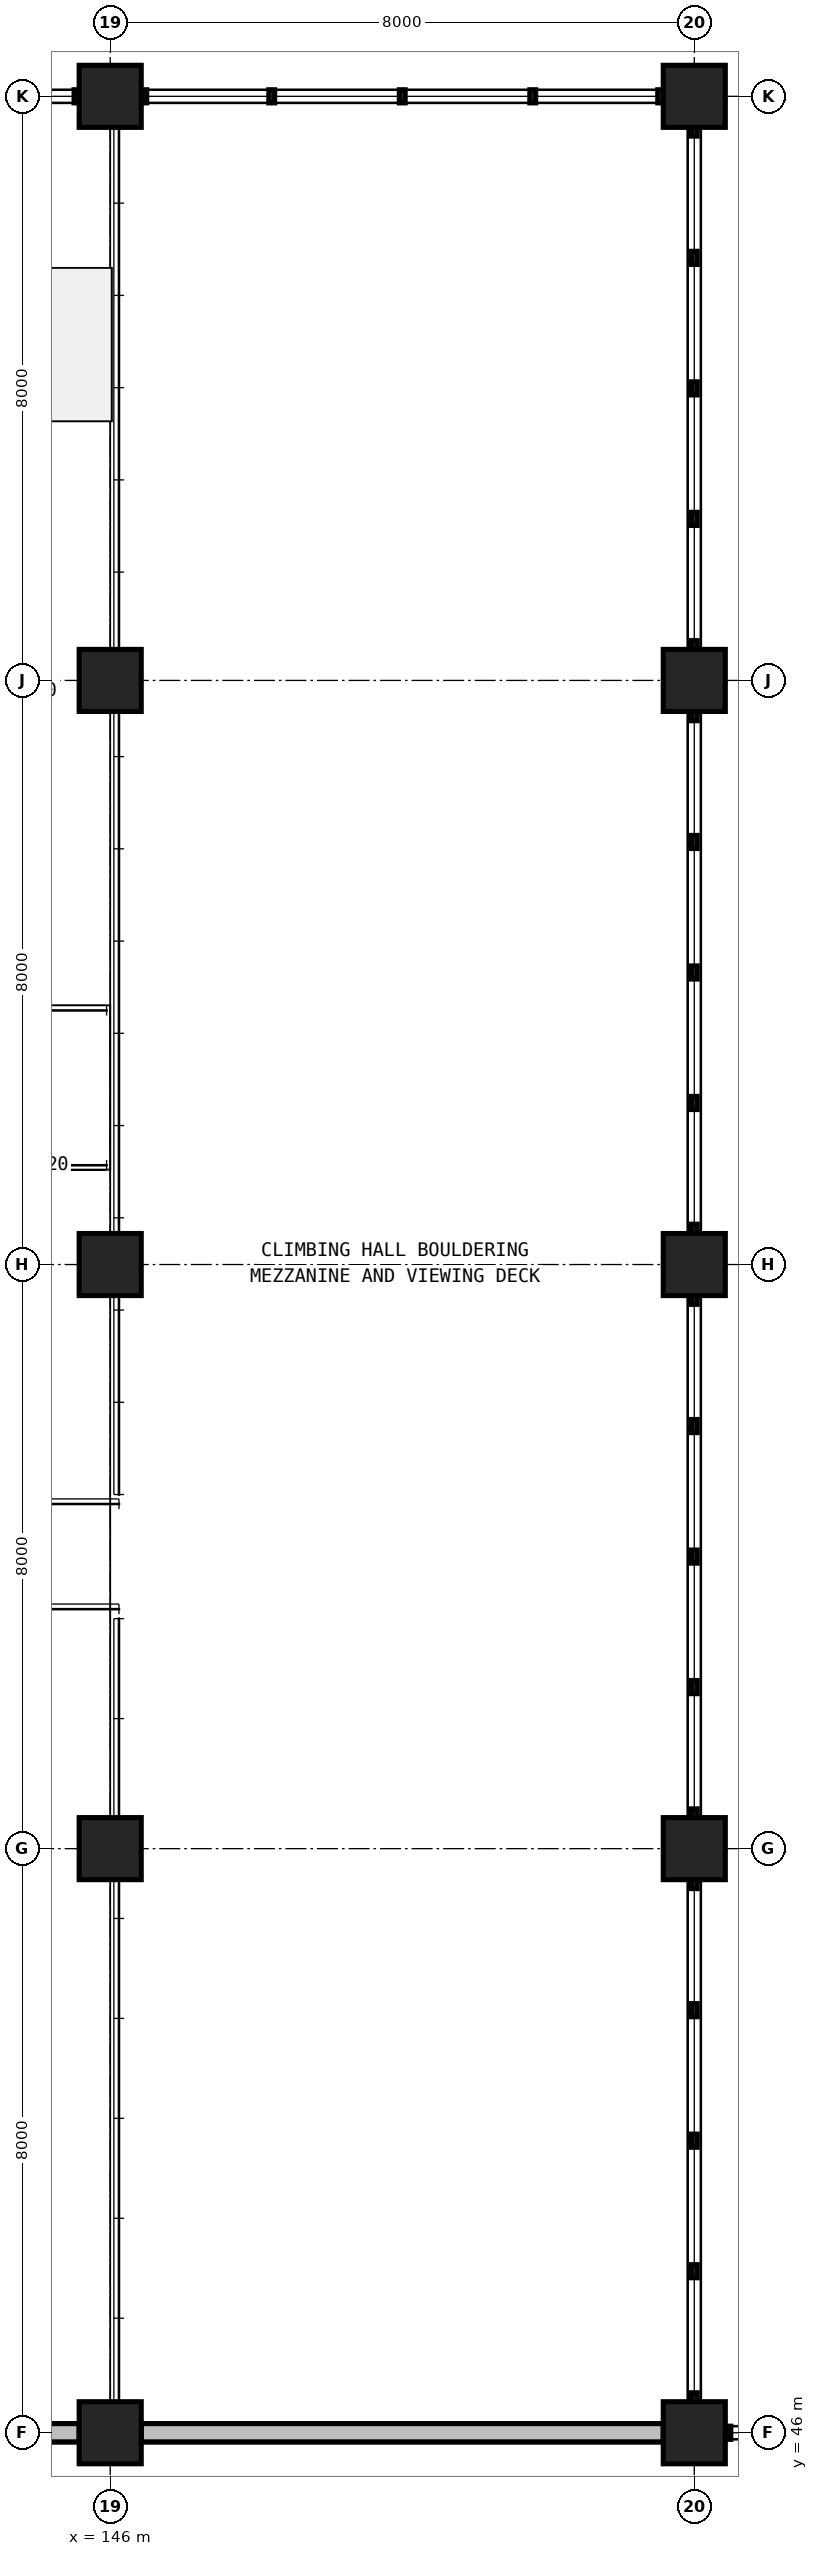
"""IFC4 building model, lengths in metres.
Left out: names, types, materials, properties, quantities, classifications, styles, units other than length and angle.
Written with IfcOpenShell. Run it as: python <this file> out.ifc"""

import sys

from ifc_helpers import new_model, si_unit, direction, frame, frame_2d, origin, origin_2d, place, context, subcontext, project, spatial, rectangle, extrude, element, save


model = new_model("IFC4")
c1 = context("Model", 3, precision=1e-05, world=origin(), true_north=direction((0.0, 1.0)))
c2 = subcontext(c1, "Body", "Model", "MODEL_VIEW")
j1 = project(units=[si_unit("LENGTHUNIT", "METRE"), si_unit("PLANEANGLEUNIT", "RADIAN")], contexts=[c1])
p1 = place(None, origin())
s1 = spatial("IfcSite", under=j1, at=p1, CompositionType="ELEMENT")
p2 = place(p1, origin())
s2 = spatial("IfcBuilding", under=s1, at=p2, CompositionType="ELEMENT")
p3 = place(p2, frame((0.0, 0.0, 5.4)))
s3 = spatial("IfcBuildingStorey", under=s2, at=p3, CompositionType="ELEMENT", Elevation=5.4)
for number, where, z_axis, x_axis in (
    (1, (146.0, 46.0, 0.0), (0.0, 0.0, 1.0), (1.0, 0.0, 0.0)),
    (2, (146.0, 54.0, 0.0), (0.0, 0.0, 1.0), (1.0, 0.0, 0.0)),
    (3, (146.0, 62.0, 0.0), (0.0, 0.0, 1.0), (1.0, 0.0, 0.0)),
    (4, (146.0, 70.0, 0.0), (0.0, 0.0, 1.0), (1.0, 0.0, 0.0)),
    (5, (146.0, 78.0, 0.0), (0.0, 0.0, 1.0), (1.0, 0.0, 0.0)),
    (6, (154.0, 46.0, 0.0), (0.0, 0.0, 1.0), (1.0, 0.0, 0.0)),
    (7, (154.0, 54.0, 0.0), (0.0, 0.0, 1.0), (1.0, 0.0, 0.0)),
    (8, (154.0, 62.0, 0.0), (0.0, 0.0, 1.0), (1.0, 0.0, 0.0)),
    (9, (154.0, 70.0, 0.0), (0.0, 0.0, 1.0), (1.0, 0.0, 0.0)),
    (10, (154.0, 78.0, 0.0), (0.0, 0.0, 1.0), (1.0, 0.0, 0.0)),
):
    element("IfcColumn", number, at=place(p3, frame(where, z_axis=z_axis, x_axis=x_axis)), inside=s3, PredefinedType="COLUMN", context=c2, shape_type="SweptSolid", body=[
        extrude(rectangle(XDim=0.85, YDim=0.85, at=origin_2d()), origin(), (0.0, 0.0, 1.0), 5.4),
    ])
for number, where, z_axis, x_axis in (
    (11, (138.425, 46.0, -0.27), (0.0, 0.0, 1.0), (1.0, 0.0, 0.0)),
    (12, (146.425, 46.0, -0.27), (0.0, 0.0, 1.0), (1.0, 0.0, 0.0)),
):
    element("IfcWall", number, at=place(p3, frame(where, z_axis=z_axis, x_axis=x_axis)), inside=s3, PredefinedType="SOLIDWALL", context=c2, shape_type="SweptSolid", body=[
        extrude(rectangle(XDim=7.15, YDim=0.25, at=frame_2d((3.575, 0.0))), origin(), (0.0, 0.0, 1.0), 1.344),
    ])
p4 = place(p3, frame((138.425, 46.0, 1.48), z_axis=(0.0, 0.0, 1.0), x_axis=(1.0, 0.0, 0.0)))
e13 = element("IfcWall", 13, at=p4, inside=s3, PredefinedType="SOLIDWALL", context=c2, shape_type="SweptSolid", body=[
    extrude(rectangle(XDim=7.15, YDim=0.25, at=frame_2d((3.575, 0.0))), origin(), (0.0, 0.0, 1.0), 2.56),
])
p5 = place(p3, frame((146.425, 46.0, 1.48), z_axis=(0.0, 0.0, 1.0), x_axis=(1.0, 0.0, 0.0)))
e14 = element("IfcWall", 14, at=p5, inside=s3, PredefinedType="SOLIDWALL", context=c2, shape_type="SweptSolid", body=[
    extrude(rectangle(XDim=7.15, YDim=0.25, at=frame_2d((3.575, 0.0))), origin(), (0.0, 0.0, 1.0), 3.06),
])
save(model, sys.argv[1])
